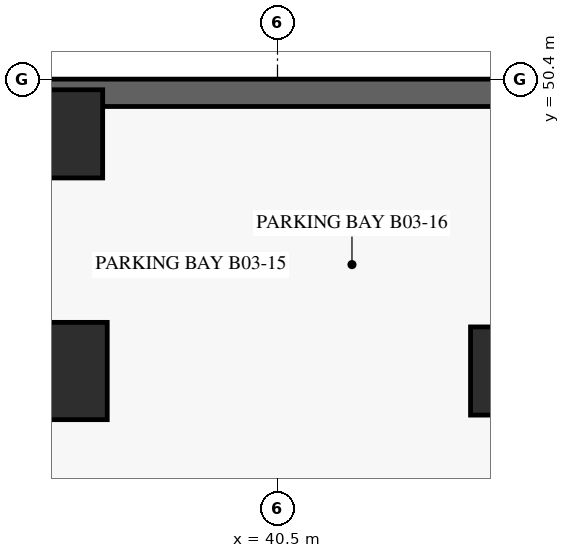
"""IFC4 building model, lengths in metres.
Left out: names, types, materials, properties, quantities, classifications, styles, units other than length and angle.
Written with IfcOpenShell. Run it as: python <this file> out.ifc"""

import sys

from ifc_helpers import new_model, si_unit, direction, frame, frame_2d, origin, origin_2d, place, context, subcontext, project, spatial, rectangle, extrude, source, transform, mapped, element, save


model = new_model("IFC4")
c1 = context("Model", 3, precision=1e-05, world=origin(), true_north=direction((0.0, 1.0)))
c2 = subcontext(c1, "Body", "Model", "MODEL_VIEW")
j1 = project(units=[si_unit("LENGTHUNIT", "METRE"), si_unit("PLANEANGLEUNIT", "RADIAN")], contexts=[c1])
p1 = place(None, origin())
s1 = spatial("IfcSite", under=j1, at=p1, CompositionType="ELEMENT")
p2 = place(p1, origin())
s2 = spatial("IfcBuilding", under=s1, at=p2, CompositionType="ELEMENT")
p3 = place(p2, frame((0.0, 0.0, -10.8)))
s3 = spatial("IfcBuildingStorey", under=s2, at=p3, CompositionType="ELEMENT", Elevation=-10.8)
p4 = place(p3, frame((64.575, 50.175, 0.0), z_axis=(0.0, 0.0, 1.0), x_axis=(-1.0, 0.0, 0.0)))
e1 = element("IfcWall", 1, at=p4, inside=s3, PredefinedType="USERDEFINED", context=c2, shape_type="SweptSolid", body=[
    extrude(rectangle(XDim=64.35, YDim=0.45, at=frame_2d((32.175, 0.0))), origin(), (0.0, 0.0, 1.0), 3.238),
])
m1 = source(origin(), c2, "Body", "SweptSolid", [
    extrude(rectangle(XDim=1.6, YDim=1.6, at=origin_2d()), origin(), (0.0, 0.0, 1.0), 3.24),
])
p5 = place(p3, frame((36.9, 45.6, 0.0), z_axis=(0.0, 0.0, 1.0), x_axis=(1.0, 0.0, 0.0)))
e2 = element("IfcColumn", 2, at=p5, inside=s3, PredefinedType="COLUMN", context=c2, shape_type="MappedRepresentation", body=[
    mapped(m1, transform((0.0, 0.0, 0.0), scale=1.0)),
])
m2 = source(origin(), c2, "Body", "SweptSolid", [
    extrude(rectangle(XDim=1.45, YDim=1.45, at=origin_2d()), origin(), (0.0, 0.0, 1.0), 3.24),
])
for number, where, z_axis, x_axis in (
    (3, (44.4, 45.6, 0.0), (0.0, 0.0, 1.0), (1.0, 0.0, 0.0)),
    (4, (36.9, 49.5, 0.0), (0.0, 0.0, 1.0), (1.0, 0.0, 0.0)),
):
    element("IfcColumn", number, at=place(p3, frame(where, z_axis=z_axis, x_axis=x_axis)), inside=s3, PredefinedType="COLUMN", context=c2, shape_type="MappedRepresentation", body=[
        mapped(m2, transform((0.0, 0.0, 0.0), scale=1.0)),
    ])
save(model, sys.argv[1])
